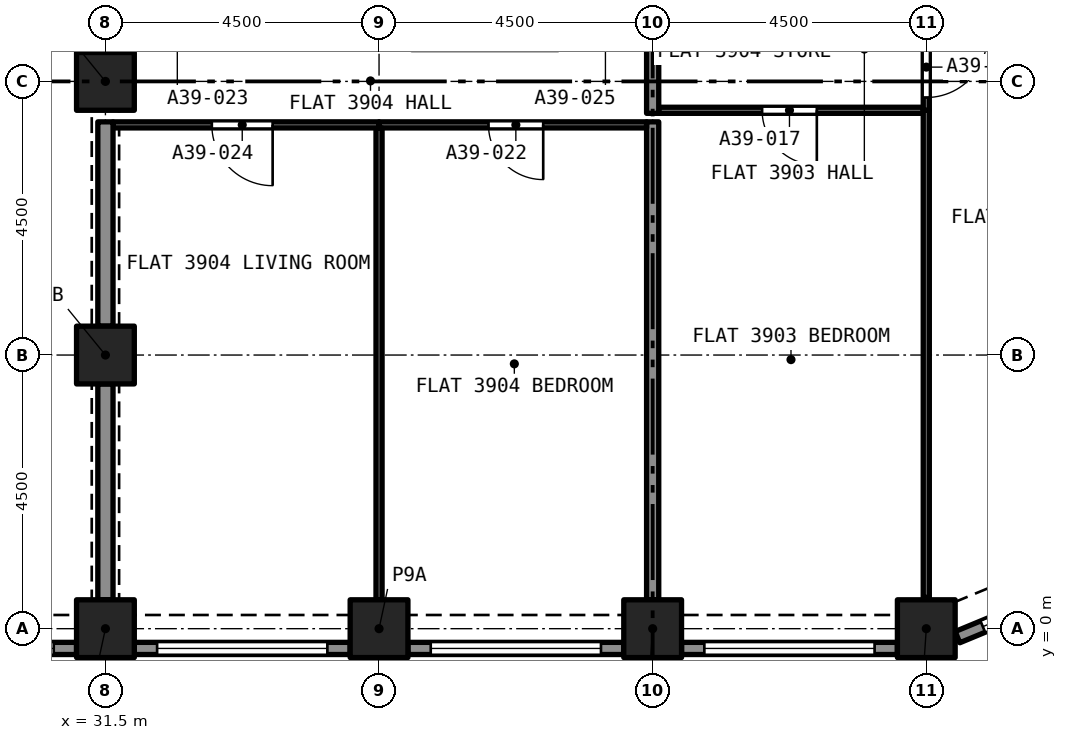
"""IFC4 building model, lengths in metres.
Left out: names, types, materials, properties, quantities, classifications, styles, units other than length and angle.
Written with IfcOpenShell. Run it as: python <this file> out.ifc"""

import sys

from ifc_helpers import new_model, si_unit, direction, frame, frame_2d, origin, origin_2d, place, context, subcontext, project, spatial, rectangle, extrude, element, fill, save


model = new_model("IFC4")
c1 = context("Model", 3, precision=1e-05, world=origin(), true_north=direction((0.0, 1.0)))
c2 = subcontext(c1, "Body", "Model", "MODEL_VIEW")
j1 = project(units=[si_unit("LENGTHUNIT", "METRE"), si_unit("PLANEANGLEUNIT", "RADIAN")], contexts=[c1])
p1 = place(None, origin())
s1 = spatial("IfcSite", under=j1, at=p1, CompositionType="ELEMENT")
p2 = place(p1, origin())
s2 = spatial("IfcBuilding", under=s1, at=p2, CompositionType="ELEMENT")
p3 = place(p2, frame((0.0, 0.0, 139.8)))
s3 = spatial("IfcBuildingStorey", under=s2, at=p3, CompositionType="ELEMENT", Elevation=139.8)
for number, where, z_axis, x_axis in (
    (1, (31.5, 0.0, 0.0), (0.0, 0.0, 1.0), (1.0, 0.0, 0.0)),
    (2, (36.0, 0.0, 0.0), (0.0, 0.0, 1.0), (1.0, 0.0, 0.0)),
    (3, (40.5, 0.0, 0.0), (0.0, 0.0, 1.0), (1.0, 0.0, 0.0)),
    (4, (45.0, 0.0, 0.0), (0.0, 0.0, 1.0), (1.0, 0.0, 0.0)),
    (5, (31.5, 4.5, 0.0), (0.0, 0.0, 1.0), (1.0, 0.0, 0.0)),
    (6, (31.5, 9.0, 0.0), (0.0, 0.0, 1.0), (1.0, 0.0, 0.0)),
):
    element("IfcColumn", number, at=place(p3, frame(where, z_axis=z_axis, x_axis=x_axis)), inside=s3, PredefinedType="COLUMN", context=c2, shape_type="SweptSolid", body=[
        extrude(rectangle(XDim=0.95, YDim=0.95, at=origin_2d()), origin(), (0.0, 0.0, 1.0), 3.2),
    ])
p4 = place(p3, frame((31.025, -0.325, 0.0), z_axis=(0.0, 0.0, 1.0), x_axis=(-1.0, 0.0, 0.0)))
e7 = element("IfcWall", 7, at=p4, inside=s3, PredefinedType="SOLIDWALL", context=c2, shape_type="SweptSolid", body=[
    extrude(rectangle(XDim=3.55, YDim=0.2, at=frame_2d((1.775, 0.0))), origin(), (0.0, 0.0, 1.0), 3.2),
])
p5 = place(p4, frame((0.375, 0.0, 0.45)))
e8 = element("IfcOpeningElement", 8, at=p5, cuts=e7, PredefinedType="OPENING", context=c2, shape_type="SweptSolid", body=[
    extrude(rectangle(XDim=2.8, YDim=1.95, at=frame_2d((1.4, 0.975))), frame((0.0, 0.11, 0.0), z_axis=(0.0, -1.0, 0.0), x_axis=(1.0, 0.0, 0.0)), (0.0, 0.0, 1.0), 0.22),
])
p6 = place(p3, frame((35.525, -0.325, 0.0), z_axis=(0.0, 0.0, 1.0), x_axis=(-1.0, 0.0, 0.0)))
e9 = element("IfcWall", 9, at=p6, inside=s3, PredefinedType="SOLIDWALL", context=c2, shape_type="SweptSolid", body=[
    extrude(rectangle(XDim=3.55, YDim=0.2, at=frame_2d((1.775, 0.0))), origin(), (0.0, 0.0, 1.0), 3.2),
])
p7 = place(p6, frame((0.375, 0.0, 0.45)))
e10 = element("IfcOpeningElement", 10, at=p7, cuts=e9, PredefinedType="OPENING", context=c2, shape_type="SweptSolid", body=[
    extrude(rectangle(XDim=2.8, YDim=1.95, at=frame_2d((1.4, 0.975))), frame((0.0, 0.11, 0.0), z_axis=(0.0, -1.0, 0.0), x_axis=(1.0, 0.0, 0.0)), (0.0, 0.0, 1.0), 0.22),
])
p8 = place(p3, frame((40.025, -0.325, 0.0), z_axis=(0.0, 0.0, 1.0), x_axis=(-1.0, 0.0, 0.0)))
e11 = element("IfcWall", 11, at=p8, inside=s3, PredefinedType="SOLIDWALL", context=c2, shape_type="SweptSolid", body=[
    extrude(rectangle(XDim=3.55, YDim=0.2, at=frame_2d((1.775, 0.0))), origin(), (0.0, 0.0, 1.0), 3.2),
])
p9 = place(p8, frame((0.375, 0.0, 0.45)))
e12 = element("IfcOpeningElement", 12, at=p9, cuts=e11, PredefinedType="OPENING", context=c2, shape_type="SweptSolid", body=[
    extrude(rectangle(XDim=2.8, YDim=1.95, at=frame_2d((1.4, 0.975))), frame((0.0, 0.11, 0.0), z_axis=(0.0, -1.0, 0.0), x_axis=(1.0, 0.0, 0.0)), (0.0, 0.0, 1.0), 0.22),
])
p10 = place(p3, frame((44.525, -0.325, 0.0), z_axis=(0.0, 0.0, 1.0), x_axis=(-1.0, 0.0, 0.0)))
e13 = element("IfcWall", 13, at=p10, inside=s3, PredefinedType="SOLIDWALL", context=c2, shape_type="SweptSolid", body=[
    extrude(rectangle(XDim=3.55, YDim=0.2, at=frame_2d((1.775, 0.0))), origin(), (0.0, 0.0, 1.0), 3.2),
])
p11 = place(p10, frame((0.375, 0.0, 0.45)))
e14 = element("IfcOpeningElement", 14, at=p11, cuts=e13, PredefinedType="OPENING", context=c2, shape_type="SweptSolid", body=[
    extrude(rectangle(XDim=2.8, YDim=1.95, at=frame_2d((1.4, 0.975))), frame((0.0, 0.11, 0.0), z_axis=(0.0, -1.0, 0.0), x_axis=(1.0, 0.0, 0.0)), (0.0, 0.0, 1.0), 0.22),
])
p12 = place(p3, frame((47.733, 0.78, 0.0), z_axis=(0.0, 0.0, 1.0), x_axis=(-0.923880599843, -0.382680855588, 0.0)))
e15 = element("IfcWall", 15, at=p12, inside=s3, PredefinedType="SOLIDWALL", context=c2, shape_type="SweptSolid", body=[
    extrude(rectangle(XDim=2.403, YDim=0.2, at=frame_2d((1.201, 0.0))), origin(), (0.0, 0.0, 1.0), 3.2),
])
p13 = place(p12, frame((0.251, 0.0, 0.45)))
e16 = element("IfcOpeningElement", 16, at=p13, cuts=e15, PredefinedType="OPENING", context=c2, shape_type="SweptSolid", body=[
    extrude(rectangle(XDim=1.7, YDim=1.95, at=frame_2d((0.85, 0.975))), frame((0.0, 0.11, 0.0), z_axis=(0.0, -1.0, 0.0), x_axis=(1.0, 0.0, 0.0)), (0.0, 0.0, 1.0), 0.22),
])
p14 = place(p3, frame((44.95, 8.525, 0.0), z_axis=(0.0, 0.0, 1.0), x_axis=(-1.0, 0.0, 0.0)))
e17 = element("IfcWall", 17, at=p14, inside=s3, PredefinedType="PARTITIONING", context=c2, shape_type="SweptSolid", body=[
    extrude(rectangle(XDim=4.35, YDim=0.1, at=frame_2d((2.175, 0.0))), origin(), (0.0, 0.0, 1.0), 2.9),
])
p15 = place(p14, frame((1.75, 0.0, 0.0)))
e18 = element("IfcOpeningElement", 18, at=p15, cuts=e17, PredefinedType="OPENING", context=c2, shape_type="SweptSolid", body=[
    extrude(rectangle(XDim=0.9, YDim=2.1, at=frame_2d((0.45, 1.05))), frame((0.0, 0.06, 0.0), z_axis=(0.0, -1.0, 0.0), x_axis=(1.0, 0.0, 0.0)), (0.0, 0.0, 1.0), 0.12),
])
p16 = place(p3, frame((45.0, 0.514, 0.0), z_axis=(0.0, 0.0, 1.0), x_axis=(0.0, 1.0, 0.0)))
e19 = element("IfcWall", 19, at=p16, inside=s3, PredefinedType="PARTITIONING", context=c2, shape_type="SweptSolid", body=[
    extrude(rectangle(XDim=8.011, YDim=0.1, at=frame_2d((4.005, 0.0))), origin(), (0.0, 0.0, 1.0), 2.9),
])
p17 = place(p3, frame((40.5, 0.475, 0.0), z_axis=(0.0, 0.0, 1.0), x_axis=(0.0, 1.0, 0.0)))
e20 = element("IfcWall", 20, at=p17, inside=s3, PredefinedType="PARTITIONING", context=c2, shape_type="SweptSolid", body=[
    extrude(rectangle(XDim=7.86, YDim=0.2, at=frame_2d((3.93, 0.0))), origin(), (0.0, 0.0, 1.0), 2.9),
])
p18 = place(p3, frame((45.0, 13.9, 0.0), z_axis=(0.0, 0.0, 1.0), x_axis=(0.0, -1.0, 0.0)))
e21 = element("IfcWall", 21, at=p18, inside=s3, PredefinedType="PARTITIONING", context=c2, shape_type="SweptSolid", body=[
    extrude(rectangle(XDim=5.375, YDim=0.1, at=frame_2d((2.688, 0.0))), origin(), (0.0, 0.0, 1.0), 2.9),
])
p19 = place(p18, frame((4.165, 0.0, 0.0)))
e22 = element("IfcOpeningElement", 22, at=p19, cuts=e21, PredefinedType="OPENING", context=c2, shape_type="SweptSolid", body=[
    extrude(rectangle(XDim=1.0, YDim=2.1, at=frame_2d((0.5, 1.05))), frame((0.0, 0.06, 0.0), z_axis=(0.0, -1.0, 0.0), x_axis=(1.0, 0.0, 0.0)), (0.0, 0.0, 1.0), 0.12),
])
p20 = place(p3, frame((40.5, 8.475, 0.0), z_axis=(0.0, 0.0, 1.0), x_axis=(0.0, 1.0, 0.0)))
e23 = element("IfcWall", 23, at=p20, inside=s3, PredefinedType="PARTITIONING", context=c2, shape_type="SweptSolid", body=[
    extrude(rectangle(XDim=5.425, YDim=0.2, at=frame_2d((2.712, 0.0))), origin(), (0.0, 0.0, 1.0), 2.9),
])
p21 = place(p3, frame((40.4, 8.285, 0.0), z_axis=(0.0, 0.0, 1.0), x_axis=(-1.0, 0.0, 0.0)))
e24 = element("IfcWall", 24, at=p21, inside=s3, PredefinedType="PARTITIONING", context=c2, shape_type="SweptSolid", body=[
    extrude(rectangle(XDim=4.4, YDim=0.1, at=frame_2d((2.2, 0.0))), origin(), (0.0, 0.0, 1.0), 2.9),
])
p22 = place(p21, frame((1.7, 0.0, 0.0)))
e25 = element("IfcOpeningElement", 25, at=p22, cuts=e24, PredefinedType="OPENING", context=c2, shape_type="SweptSolid", body=[
    extrude(rectangle(XDim=0.9, YDim=2.1, at=frame_2d((0.45, 1.05))), frame((0.0, 0.06, 0.0), z_axis=(0.0, -1.0, 0.0), x_axis=(1.0, 0.0, 0.0)), (0.0, 0.0, 1.0), 0.12),
])
p23 = place(p3, frame((36.0, 0.475, 0.0), z_axis=(0.0, 0.0, 1.0), x_axis=(0.0, 1.0, 0.0)))
e26 = element("IfcWall", 26, at=p23, inside=s3, PredefinedType="PARTITIONING", context=c2, shape_type="SweptSolid", body=[
    extrude(rectangle(XDim=7.76, YDim=0.1, at=frame_2d((3.88, 0.0))), origin(), (0.0, 0.0, 1.0), 2.9),
])
p24 = place(p3, frame((36.0, 8.285, 0.0), z_axis=(0.0, 0.0, 1.0), x_axis=(-1.0, 0.0, 0.0)))
e27 = element("IfcWall", 27, at=p24, inside=s3, PredefinedType="PARTITIONING", context=c2, shape_type="SweptSolid", body=[
    extrude(rectangle(XDim=4.375, YDim=0.1, at=frame_2d((2.188, 0.0))), origin(), (0.0, 0.0, 1.0), 2.9),
])
p25 = place(p24, frame((1.75, 0.0, 0.0)))
e28 = element("IfcOpeningElement", 28, at=p25, cuts=e27, PredefinedType="OPENING", context=c2, shape_type="SweptSolid", body=[
    extrude(rectangle(XDim=1.0, YDim=2.1, at=frame_2d((0.5, 1.05))), frame((0.0, 0.06, 0.0), z_axis=(0.0, -1.0, 0.0), x_axis=(1.0, 0.0, 0.0)), (0.0, 0.0, 1.0), 0.12),
])
p26 = place(p3, frame((31.5, 0.475, 0.0), z_axis=(0.0, 0.0, 1.0), x_axis=(0.0, 1.0, 0.0)))
e29 = element("IfcWall", 29, at=p26, inside=s3, PredefinedType="PARTITIONING", context=c2, shape_type="SweptSolid", body=[
    extrude(rectangle(XDim=3.55, YDim=0.25, at=frame_2d((1.775, 0.0))), origin(), (0.0, 0.0, 1.0), 2.38),
])
p27 = place(p3, frame((31.5, 4.975, 0.0), z_axis=(0.0, 0.0, 1.0), x_axis=(0.0, 1.0, 0.0)))
e30 = element("IfcWall", 30, at=p27, inside=s3, PredefinedType="PARTITIONING", context=c2, shape_type="SweptSolid", body=[
    extrude(rectangle(XDim=3.36, YDim=0.25, at=frame_2d((1.68, 0.0))), origin(), (0.0, 0.0, 1.0), 2.38),
])
p28 = place(p5, origin())
e31 = element("IfcWindow", 31, at=p28, inside=s3, PartitioningType="SINGLE_PANEL", PredefinedType="WINDOW", context=c2, shape_type="SweptSolid", body=[
    extrude(rectangle(XDim=2.8, YDim=1.95, at=frame_2d((1.4, 0.975))), frame((0.0, 0.03, 0.0), z_axis=(0.0, -1.0, 0.0), x_axis=(1.0, 0.0, 0.0)), (0.0, 0.0, 1.0), 0.06),
])
fill(e8, e31)
p29 = place(p7, origin())
e32 = element("IfcWindow", 32, at=p29, inside=s3, PartitioningType="SINGLE_PANEL", PredefinedType="WINDOW", context=c2, shape_type="SweptSolid", body=[
    extrude(rectangle(XDim=2.8, YDim=1.95, at=frame_2d((1.4, 0.975))), frame((0.0, 0.03, 0.0), z_axis=(0.0, -1.0, 0.0), x_axis=(1.0, 0.0, 0.0)), (0.0, 0.0, 1.0), 0.06),
])
fill(e10, e32)
p30 = place(p9, origin())
e33 = element("IfcWindow", 33, at=p30, inside=s3, PartitioningType="SINGLE_PANEL", PredefinedType="WINDOW", context=c2, shape_type="SweptSolid", body=[
    extrude(rectangle(XDim=2.8, YDim=1.95, at=frame_2d((1.4, 0.975))), frame((0.0, 0.03, 0.0), z_axis=(0.0, -1.0, 0.0), x_axis=(1.0, 0.0, 0.0)), (0.0, 0.0, 1.0), 0.06),
])
fill(e12, e33)
p31 = place(p11, origin())
e34 = element("IfcWindow", 34, at=p31, inside=s3, PartitioningType="SINGLE_PANEL", PredefinedType="WINDOW", context=c2, shape_type="SweptSolid", body=[
    extrude(rectangle(XDim=2.8, YDim=1.95, at=frame_2d((1.4, 0.975))), frame((0.0, 0.03, 0.0), z_axis=(0.0, -1.0, 0.0), x_axis=(1.0, 0.0, 0.0)), (0.0, 0.0, 1.0), 0.06),
])
fill(e14, e34)
p32 = place(p13, origin())
e35 = element("IfcWindow", 35, at=p32, inside=s3, PartitioningType="SINGLE_PANEL", PredefinedType="WINDOW", context=c2, shape_type="SweptSolid", body=[
    extrude(rectangle(XDim=1.7, YDim=1.95, at=frame_2d((0.85, 0.975))), frame((0.0, 0.03, 0.0), z_axis=(0.0, -1.0, 0.0), x_axis=(1.0, 0.0, 0.0)), (0.0, 0.0, 1.0), 0.06),
])
fill(e16, e35)
p33 = place(p15, origin())
e36 = element("IfcDoor", 36, at=p33, inside=s3, OperationType="SINGLE_SWING_RIGHT", PredefinedType="DOOR", context=c2, shape_type="SweptSolid", body=[
    extrude(rectangle(XDim=0.9, YDim=2.1, at=frame_2d((0.45, 1.05))), frame((0.0, 0.025, 0.0), z_axis=(0.0, -1.0, 0.0), x_axis=(1.0, 0.0, 0.0)), (0.0, 0.0, 1.0), 0.05),
])
fill(e18, e36)
p34 = place(p19, origin())
e37 = element("IfcDoor", 37, at=p34, inside=s3, OperationType="SINGLE_SWING_RIGHT", PredefinedType="DOOR", context=c2, shape_type="SweptSolid", body=[
    extrude(rectangle(XDim=1.0, YDim=2.1, at=frame_2d((0.5, 1.05))), frame((0.0, 0.025, 0.0), z_axis=(0.0, -1.0, 0.0), x_axis=(1.0, 0.0, 0.0)), (0.0, 0.0, 1.0), 0.05),
])
fill(e22, e37)
p35 = place(p22, origin())
e38 = element("IfcDoor", 38, at=p35, inside=s3, OperationType="SINGLE_SWING_LEFT", PredefinedType="DOOR", context=c2, shape_type="SweptSolid", body=[
    extrude(rectangle(XDim=0.9, YDim=2.1, at=frame_2d((0.45, 1.05))), frame((0.0, 0.025, 0.0), z_axis=(0.0, -1.0, 0.0), x_axis=(1.0, 0.0, 0.0)), (0.0, 0.0, 1.0), 0.05),
])
fill(e25, e38)
p36 = place(p25, origin())
e39 = element("IfcDoor", 39, at=p36, inside=s3, OperationType="SINGLE_SWING_RIGHT", PredefinedType="DOOR", context=c2, shape_type="SweptSolid", body=[
    extrude(rectangle(XDim=1.0, YDim=2.1, at=frame_2d((0.5, 1.05))), frame((0.0, 0.025, 0.0), z_axis=(0.0, -1.0, 0.0), x_axis=(1.0, 0.0, 0.0)), (0.0, 0.0, 1.0), 0.05),
])
fill(e28, e39)
save(model, sys.argv[1])
